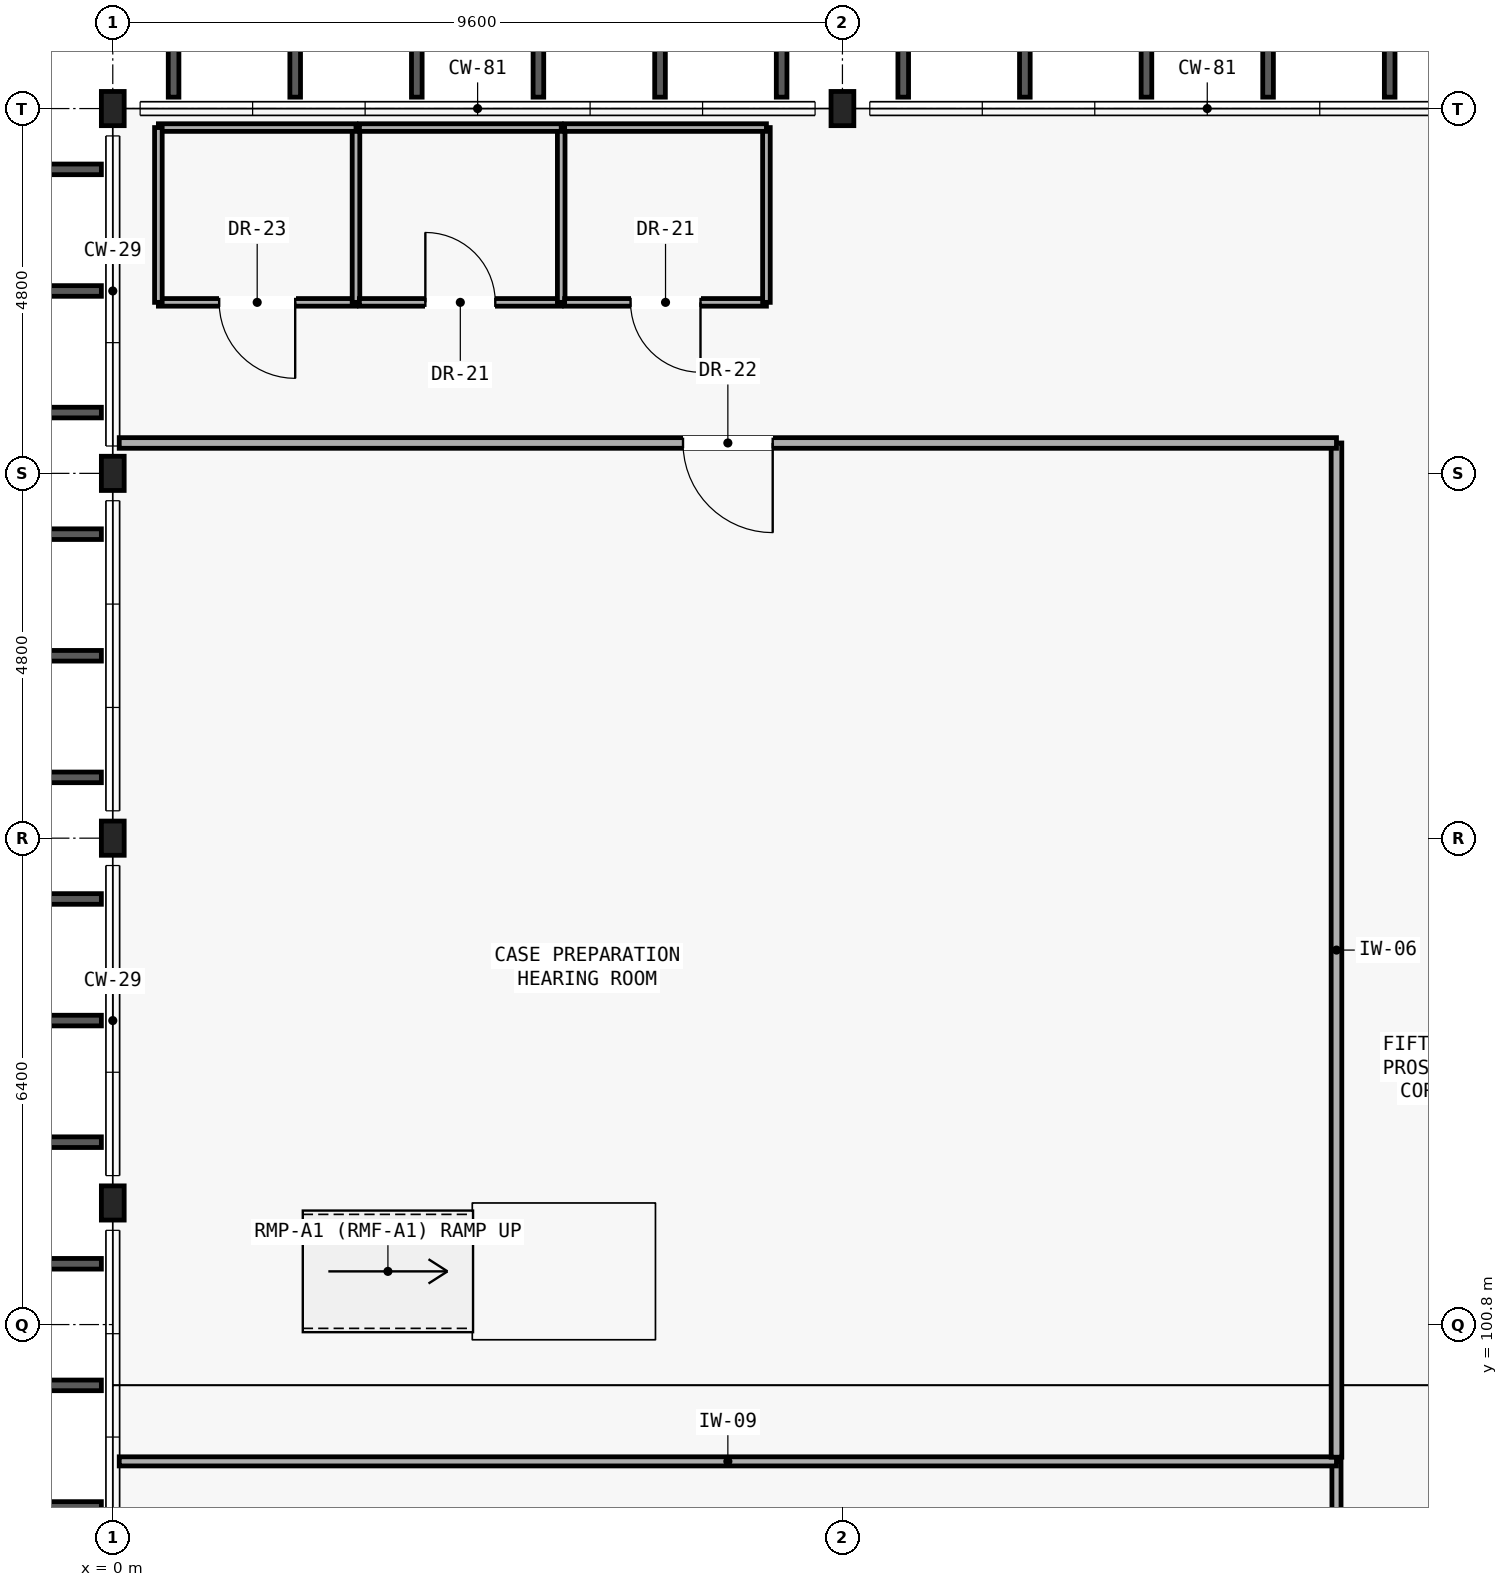
"""IFC4 building model, lengths in metres.
Left out: names, types, materials, properties, quantities, classifications, styles, units other than length and angle.
Written with IfcOpenShell. Run it as: python <this file> out.ifc"""

import sys

from ifc_helpers import new_model, si_unit, direction, frame, frame_2d, origin, origin_2d, place, context, subcontext, project, spatial, rectangle, i_section, extrude, element, fill, save


model = new_model("IFC4")
c1 = context("Model", 3, precision=1e-05, world=origin(), true_north=direction((0.0, 1.0)))
c2 = subcontext(c1, "Body", "Model", "MODEL_VIEW")
j1 = project(units=[si_unit("LENGTHUNIT", "METRE"), si_unit("PLANEANGLEUNIT", "RADIAN")], contexts=[c1])
p1 = place(None, origin())
s1 = spatial("IfcSite", under=j1, at=p1, CompositionType="ELEMENT")
p2 = place(p1, origin())
s2 = spatial("IfcBuilding", under=s1, at=p2, CompositionType="ELEMENT")
p3 = place(p2, frame((0.0, 0.0, 22.05)))
s3 = spatial("IfcBuildingStorey", under=s2, at=p3, CompositionType="ELEMENT", Elevation=22.05)
for number, where, z_axis, x_axis in (
    (1, (0.0, 102.4, 0.0), (0.0, 0.0, 1.0), (1.0, 0.0, 0.0)),
    (2, (0.0, 107.2, 0.0), (0.0, 0.0, 1.0), (1.0, 0.0, 0.0)),
    (3, (0.0, 112.0, 0.0), (0.0, 0.0, 1.0), (1.0, 0.0, 0.0)),
    (4, (0.0, 116.8, 0.0), (0.0, 0.0, 1.0), (1.0, 0.0, 0.0)),
    (5, (9.6, 116.8, 0.0), (0.0, 0.0, 1.0), (1.0, 0.0, 0.0)),
):
    element("IfcColumn", number, at=place(p3, frame(where, z_axis=z_axis, x_axis=x_axis)), inside=s3, PredefinedType="COLUMN", context=c2, shape_type="SweptSolid", body=[
        extrude(i_section(OverallWidth=0.3, OverallDepth=0.45, WebThickness=0.014, FlangeThickness=0.026, FilletRadius=0.027, at=origin_2d()), origin(), (0.0, 0.0, 1.0), 4.2),
    ])
p4 = place(p3, frame((16.1, 83.285, 0.0), z_axis=(0.0, 0.0, 1.0), x_axis=(0.0, 1.0, 0.0)))
e6 = element("IfcWall", 6, at=p4, inside=s3, PredefinedType="PARTITIONING", context=c2, shape_type="SweptSolid", body=[
    extrude(rectangle(XDim=15.715, YDim=0.12, at=frame_2d((7.857, 0.0))), origin(), (0.0, 0.0, 1.0), 4.0),
])
p5 = place(p4, frame((7.367, 0.0, 0.0)))
e7 = element("IfcOpeningElement", 7, at=p5, cuts=e6, PredefinedType="OPENING", context=c2, shape_type="SweptSolid", body=[
    extrude(rectangle(XDim=0.98, YDim=2.1, at=frame_2d((0.49, 1.05))), frame((0.0, 0.07, 0.0), z_axis=(0.0, -1.0, 0.0), x_axis=(1.0, 0.0, 0.0)), (0.0, 0.0, 1.0), 0.14),
])
p6 = place(p3, frame((16.1, 99.0, 0.0), z_axis=(0.0, 0.0, 1.0), x_axis=(-1.0, 0.0, 0.0)))
e8 = element("IfcWall", 8, at=p6, inside=s3, PredefinedType="PARTITIONING", context=c2, shape_type="SweptSolid", body=[
    extrude(rectangle(XDim=16.015, YDim=0.12, at=frame_2d((8.008, 0.0))), origin(), (0.0, 0.0, 1.0), 4.0),
])
p7 = place(p3, frame((16.1, 99.055, 0.0), z_axis=(0.0, 0.0, 1.0), x_axis=(0.0, 1.0, 0.0)))
e9 = element("IfcWall", 9, at=p7, inside=s3, PredefinedType="PARTITIONING", context=c2, shape_type="SweptSolid", body=[
    extrude(rectangle(XDim=13.345, YDim=0.14, at=frame_2d((6.672, 0.0))), origin(), (0.0, 0.0, 1.0), 4.0),
])
p8 = place(p3, frame((16.1, 112.4, 0.0), z_axis=(0.0, 0.0, 1.0), x_axis=(-1.0, 0.0, 0.0)))
e10 = element("IfcWall", 10, at=p8, inside=s3, PredefinedType="PARTITIONING", context=c2, shape_type="SweptSolid", body=[
    extrude(rectangle(XDim=16.015, YDim=0.14, at=frame_2d((8.008, 0.0))), origin(), (0.0, 0.0, 1.0), 4.0),
])
p9 = place(p8, frame((7.417, 0.0, 0.0)))
e11 = element("IfcOpeningElement", 11, at=p9, cuts=e10, PredefinedType="OPENING", context=c2, shape_type="SweptSolid", body=[
    extrude(rectangle(XDim=1.18, YDim=2.1, at=frame_2d((0.59, 1.05))), frame((0.0, 0.08, 0.0), z_axis=(0.0, -1.0, 0.0), x_axis=(1.0, 0.0, 0.0)), (0.0, 0.0, 1.0), 0.16),
])
p10 = place(p3, frame((0.6, 114.25, 0.0), z_axis=(0.0, 0.0, 1.0), x_axis=(1.0, 0.0, 0.0)))
e12 = element("IfcWall", 12, at=p10, inside=s3, PredefinedType="PARTITIONING", context=c2, shape_type="SweptSolid", body=[
    extrude(rectangle(XDim=2.6, YDim=0.1, at=frame_2d((1.3, 0.0))), origin(), (0.0, 0.0, 1.0), 3.48),
])
p11 = place(p10, frame((0.8, 0.0, 0.0)))
e13 = element("IfcOpeningElement", 13, at=p11, cuts=e12, PredefinedType="OPENING", context=c2, shape_type="SweptSolid", body=[
    extrude(rectangle(XDim=1.0, YDim=2.08, at=frame_2d((0.5, 1.04))), frame((0.0, 0.06, 0.0), z_axis=(0.0, -1.0, 0.0), x_axis=(1.0, 0.0, 0.0)), (0.0, 0.0, 1.0), 0.12),
])
p12 = place(p3, frame((3.2, 114.25, 0.0), z_axis=(0.0, 0.0, 1.0), x_axis=(0.0, 1.0, 0.0)))
e14 = element("IfcWall", 14, at=p12, inside=s3, PredefinedType="PARTITIONING", context=c2, shape_type="SweptSolid", body=[
    extrude(rectangle(XDim=2.3, YDim=0.1, at=frame_2d((1.15, 0.0))), origin(), (0.0, 0.0, 1.0), 4.0),
])
p13 = place(p3, frame((3.2, 116.55, 0.0), z_axis=(0.0, 0.0, 1.0), x_axis=(-1.0, 0.0, 0.0)))
e15 = element("IfcWall", 15, at=p13, inside=s3, PredefinedType="PARTITIONING", context=c2, shape_type="SweptSolid", body=[
    extrude(rectangle(XDim=2.6, YDim=0.1, at=frame_2d((1.3, 0.0))), origin(), (0.0, 0.0, 1.0), 3.08),
])
p14 = place(p3, frame((0.6, 116.55, 0.0), z_axis=(0.0, 0.0, 1.0), x_axis=(0.0, -1.0, 0.0)))
e16 = element("IfcWall", 16, at=p14, inside=s3, PredefinedType="PARTITIONING", context=c2, shape_type="SweptSolid", body=[
    extrude(rectangle(XDim=2.3, YDim=0.1, at=frame_2d((1.15, 0.0))), origin(), (0.0, 0.0, 1.0), 4.0),
])
p15 = place(p3, frame((3.245, 114.25, 0.0), z_axis=(0.0, 0.0, 1.0), x_axis=(1.0, 0.0, 0.0)))
e17 = element("IfcWall", 17, at=p15, inside=s3, PredefinedType="PARTITIONING", context=c2, shape_type="SweptSolid", body=[
    extrude(rectangle(XDim=2.655, YDim=0.1, at=frame_2d((1.327, 0.0))), origin(), (0.0, 0.0, 1.0), 3.48),
])
p16 = place(p15, frame((0.867, 0.0, 0.0)))
e18 = element("IfcOpeningElement", 18, at=p16, cuts=e17, PredefinedType="OPENING", context=c2, shape_type="SweptSolid", body=[
    extrude(rectangle(XDim=0.92, YDim=2.08, at=frame_2d((0.46, 1.04))), frame((0.0, 0.06, 0.0), z_axis=(0.0, -1.0, 0.0), x_axis=(1.0, 0.0, 0.0)), (0.0, 0.0, 1.0), 0.12),
])
p17 = place(p3, frame((5.9, 114.25, 0.0), z_axis=(0.0, 0.0, 1.0), x_axis=(0.0, 1.0, 0.0)))
e19 = element("IfcWall", 19, at=p17, inside=s3, PredefinedType="PARTITIONING", context=c2, shape_type="SweptSolid", body=[
    extrude(rectangle(XDim=2.3, YDim=0.1, at=frame_2d((1.15, 0.0))), origin(), (0.0, 0.0, 1.0), 4.0),
])
p18 = place(p3, frame((5.9, 116.55, 0.0), z_axis=(0.0, 0.0, 1.0), x_axis=(-1.0, 0.0, 0.0)))
e20 = element("IfcWall", 20, at=p18, inside=s3, PredefinedType="PARTITIONING", context=c2, shape_type="SweptSolid", body=[
    extrude(rectangle(XDim=2.655, YDim=0.1, at=frame_2d((1.327, 0.0))), origin(), (0.0, 0.0, 1.0), 3.08),
])
p19 = place(p3, frame((5.945, 114.25, 0.0), z_axis=(0.0, 0.0, 1.0), x_axis=(1.0, 0.0, 0.0)))
e21 = element("IfcWall", 21, at=p19, inside=s3, PredefinedType="PARTITIONING", context=c2, shape_type="SweptSolid", body=[
    extrude(rectangle(XDim=2.655, YDim=0.1, at=frame_2d((1.328, 0.0))), origin(), (0.0, 0.0, 1.0), 3.48),
])
p20 = place(p19, frame((0.867, 0.0, 0.0)))
e22 = element("IfcOpeningElement", 22, at=p20, cuts=e21, PredefinedType="OPENING", context=c2, shape_type="SweptSolid", body=[
    extrude(rectangle(XDim=0.92, YDim=2.08, at=frame_2d((0.46, 1.04))), frame((0.0, 0.06, 0.0), z_axis=(0.0, -1.0, 0.0), x_axis=(1.0, 0.0, 0.0)), (0.0, 0.0, 1.0), 0.12),
])
p21 = place(p3, frame((8.6, 114.25, 0.0), z_axis=(0.0, 0.0, 1.0), x_axis=(0.0, 1.0, 0.0)))
e23 = element("IfcWall", 23, at=p21, inside=s3, PredefinedType="PARTITIONING", context=c2, shape_type="SweptSolid", body=[
    extrude(rectangle(XDim=2.3, YDim=0.1, at=frame_2d((1.15, 0.0))), origin(), (0.0, 0.0, 1.0), 4.0),
])
p22 = place(p3, frame((8.6, 116.55, 0.0), z_axis=(0.0, 0.0, 1.0), x_axis=(-1.0, 0.0, 0.0)))
e24 = element("IfcWall", 24, at=p22, inside=s3, PredefinedType="PARTITIONING", context=c2, shape_type="SweptSolid", body=[
    extrude(rectangle(XDim=2.655, YDim=0.1, at=frame_2d((1.328, 0.0))), origin(), (0.0, 0.0, 1.0), 3.08),
])
p23 = place(p9, origin())
e25 = element("IfcDoor", 25, at=p23, inside=s3, OperationType="SINGLE_SWING_LEFT", PredefinedType="DOOR", context=c2, shape_type="SweptSolid", body=[
    extrude(rectangle(XDim=1.18, YDim=2.1, at=frame_2d((0.59, 1.05))), frame((0.0, 0.025, 0.0), z_axis=(0.0, -1.0, 0.0), x_axis=(1.0, 0.0, 0.0)), (0.0, 0.0, 1.0), 0.05),
])
fill(e11, e25)
p24 = place(p11, frame((1.0, 0.0, 0.0), z_axis=(0.0, 0.0, 1.0), x_axis=(-1.0, 0.0, 0.0)))
e26 = element("IfcDoor", 26, at=p24, inside=s3, OperationType="SINGLE_SWING_RIGHT", PredefinedType="DOOR", context=c2, shape_type="SweptSolid", body=[
    extrude(rectangle(XDim=1.0, YDim=2.08, at=frame_2d((0.5, 1.04))), frame((0.0, 0.025, 0.0), z_axis=(0.0, -1.0, 0.0), x_axis=(1.0, 0.0, 0.0)), (0.0, 0.0, 1.0), 0.05),
])
fill(e13, e26)
p25 = place(p16, origin())
e27 = element("IfcDoor", 27, at=p25, inside=s3, OperationType="SINGLE_SWING_LEFT", PredefinedType="DOOR", context=c2, shape_type="SweptSolid", body=[
    extrude(rectangle(XDim=0.92, YDim=2.08, at=frame_2d((0.46, 1.04))), frame((0.0, 0.025, 0.0), z_axis=(0.0, -1.0, 0.0), x_axis=(1.0, 0.0, 0.0)), (0.0, 0.0, 1.0), 0.05),
])
fill(e18, e27)
p26 = place(p20, frame((0.92, 0.0, 0.0), z_axis=(0.0, 0.0, 1.0), x_axis=(-1.0, 0.0, 0.0)))
e28 = element("IfcDoor", 28, at=p26, inside=s3, OperationType="SINGLE_SWING_RIGHT", PredefinedType="DOOR", context=c2, shape_type="SweptSolid", body=[
    extrude(rectangle(XDim=0.92, YDim=2.08, at=frame_2d((0.46, 1.04))), frame((0.0, 0.025, 0.0), z_axis=(0.0, -1.0, 0.0), x_axis=(1.0, 0.0, 0.0)), (0.0, 0.0, 1.0), 0.05),
])
fill(e22, e28)
save(model, sys.argv[1])
